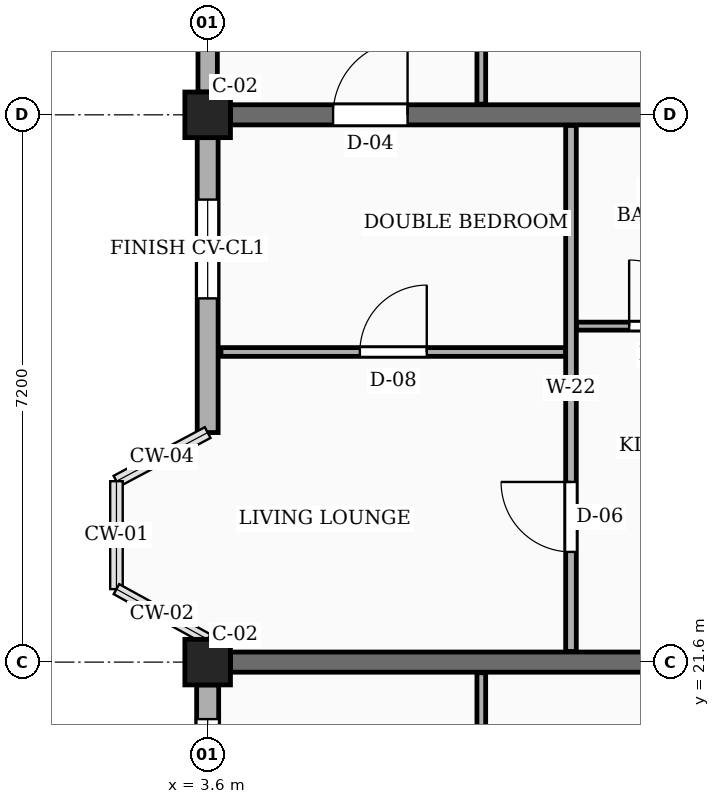
"""IFC4 building model, lengths in metres.
Left out: names, types, materials, properties, quantities, classifications, styles, units other than length and angle.
Written with IfcOpenShell. Run it as: python <this file> out.ifc"""

import sys

from ifc_helpers import new_model, si_unit, direction, frame, frame_2d, origin, origin_2d, place, context, subcontext, project, spatial, rectangle, extrude, element, fill, save


model = new_model("IFC4")
c1 = context("Model", 3, precision=1e-05, world=origin(), true_north=direction((0.0, 1.0)))
c2 = subcontext(c1, "Body", "Model", "MODEL_VIEW")
j1 = project(units=[si_unit("LENGTHUNIT", "METRE"), si_unit("PLANEANGLEUNIT", "RADIAN")], contexts=[c1])
p1 = place(None, origin())
s1 = spatial("IfcSite", under=j1, at=p1, CompositionType="ELEMENT")
p2 = place(p1, origin())
s2 = spatial("IfcBuilding", under=s1, at=p2, CompositionType="ELEMENT")
p3 = place(p2, frame((0.0, 0.0, 7.65)))
s3 = spatial("IfcBuildingStorey", under=s2, at=p3, CompositionType="ELEMENT", Elevation=7.65)
for number, where, z_axis, x_axis in (
    (1, (3.6, 21.6, 0.0), (0.0, 0.0, 1.0), (1.0, 0.0, 0.0)),
    (2, (3.6, 28.8, 0.0), (0.0, 0.0, 1.0), (1.0, 0.0, 0.0)),
):
    element("IfcColumn", number, at=place(p3, frame(where, z_axis=z_axis, x_axis=x_axis)), inside=s3, PredefinedType="COLUMN", context=c2, shape_type="SweptSolid", body=[
        extrude(rectangle(XDim=0.6, YDim=0.6, at=origin_2d()), origin(), (0.0, 0.0, 1.0), 3.15),
    ])
p4 = place(p3, frame((3.9, 21.6, 0.0), z_axis=(0.0, 0.0, 1.0), x_axis=(1.0, 0.0, 0.0)))
e3 = element("IfcWall", 3, at=p4, inside=s3, PredefinedType="SOLIDWALL", context=c2, shape_type="SweptSolid", body=[
    extrude(rectangle(XDim=6.575, YDim=0.265, at=frame_2d((3.288, 0.0))), origin(), (0.0, 0.0, 1.0), 2.17),
])
p5 = place(p3, frame((3.9, 28.8, 0.0), z_axis=(0.0, 0.0, 1.0), x_axis=(1.0, 0.0, 0.0)))
e4 = element("IfcWall", 4, at=p5, inside=s3, PredefinedType="SOLIDWALL", context=c2, shape_type="SweptSolid", body=[
    extrude(rectangle(XDim=6.575, YDim=0.265, at=frame_2d((3.288, 0.0))), origin(), (0.0, 0.0, 1.0), 2.17),
])
p6 = place(p5, frame((1.35, 0.0, 0.0)))
e5 = element("IfcOpeningElement", 5, at=p6, cuts=e4, PredefinedType="OPENING", context=c2, shape_type="SweptSolid", body=[
    extrude(rectangle(XDim=0.98, YDim=2.12, at=frame_2d((0.49, 1.06))), frame((0.0, 0.143, 0.0), z_axis=(0.0, -1.0, 0.0), x_axis=(1.0, 0.0, 0.0)), (0.0, 0.0, 1.0), 0.285),
])
p7 = place(p3, frame((3.6, 35.7, 0.0), z_axis=(0.0, 0.0, 1.0), x_axis=(0.0, -1.0, 0.0)))
e6 = element("IfcWall", 6, at=p7, inside=s3, PredefinedType="SOLIDWALL", context=c2, shape_type="SweptSolid", body=[
    extrude(rectangle(XDim=6.6, YDim=0.255, at=frame_2d((3.3, 0.0))), origin(), (0.0, 0.0, 1.0), 2.44),
])
p8 = place(p7, frame((0.45, 0.0, 0.78)))
e7 = element("IfcOpeningElement", 7, at=p8, cuts=e6, PredefinedType="OPENING", context=c2, shape_type="SweptSolid", body=[
    extrude(rectangle(XDim=1.14, YDim=1.36, at=frame_2d((0.57, 0.68))), frame((0.0, 0.137, 0.0), z_axis=(0.0, -1.0, 0.0), x_axis=(1.0, 0.0, 0.0)), (0.0, 0.0, 1.0), 0.275),
])
p9 = place(p7, frame((4.65, 0.0, 0.78)))
e8 = element("IfcOpeningElement", 8, at=p9, cuts=e6, PredefinedType="OPENING", context=c2, shape_type="SweptSolid", body=[
    extrude(rectangle(XDim=1.3, YDim=1.36, at=frame_2d((0.65, 0.68))), frame((0.0, 0.137, 0.0), z_axis=(0.0, -1.0, 0.0), x_axis=(1.0, 0.0, 0.0)), (0.0, 0.0, 1.0), 0.275),
])
p10 = place(p3, frame((3.6, 28.5, 0.0), z_axis=(0.0, 0.0, 1.0), x_axis=(0.0, -1.0, 0.0)))
e9 = element("IfcWall", 9, at=p10, inside=s3, PredefinedType="SOLIDWALL", context=c2, shape_type="SweptSolid", body=[
    extrude(rectangle(XDim=3.88, YDim=0.275, at=frame_2d((1.94, 0.0))), origin(), (0.0, 0.0, 1.0), 2.44),
])
p11 = place(p10, frame((0.815, 0.0, 0.78)))
e10 = element("IfcOpeningElement", 10, at=p11, cuts=e9, PredefinedType="OPENING", context=c2, shape_type="SweptSolid", body=[
    extrude(rectangle(XDim=1.3, YDim=1.36, at=frame_2d((0.65, 0.68))), frame((0.0, 0.147, 0.0), z_axis=(0.0, -1.0, 0.0), x_axis=(1.0, 0.0, 0.0)), (0.0, 0.0, 1.0), 0.295),
])
p12 = place(p3, frame((3.6, 21.3, 0.0), z_axis=(0.0, 0.0, 1.0), x_axis=(0.0, -1.0, 0.0)))
e11 = element("IfcWall", 11, at=p12, inside=s3, PredefinedType="SOLIDWALL", context=c2, shape_type="SweptSolid", body=[
    extrude(rectangle(XDim=6.6, YDim=0.29, at=frame_2d((3.3, 0.0))), origin(), (0.0, 0.0, 1.0), 2.44),
])
p13 = place(p12, frame((0.45, 0.0, 0.78)))
e12 = element("IfcOpeningElement", 12, at=p13, cuts=e11, PredefinedType="OPENING", context=c2, shape_type="SweptSolid", body=[
    extrude(rectangle(XDim=1.38, YDim=1.36, at=frame_2d((0.69, 0.68))), frame((0.0, 0.155, 0.0), z_axis=(0.0, -1.0, 0.0), x_axis=(1.0, 0.0, 0.0)), (0.0, 0.0, 1.0), 0.31),
])
p14 = place(p12, frame((4.65, 0.0, 0.78)))
e13 = element("IfcOpeningElement", 13, at=p14, cuts=e11, PredefinedType="OPENING", context=c2, shape_type="SweptSolid", body=[
    extrude(rectangle(XDim=0.94, YDim=1.44, at=frame_2d((0.47, 0.72))), frame((0.0, 0.155, 0.0), z_axis=(0.0, -1.0, 0.0), x_axis=(1.0, 0.0, 0.0)), (0.0, 0.0, 1.0), 0.31),
])
p15 = place(p3, frame((7.2, 14.54, 0.0), z_axis=(0.0, 0.0, 1.0), x_axis=(0.0, 1.0, 0.0)))
e14 = element("IfcWall", 14, at=p15, inside=s3, PredefinedType="PARTITIONING", context=c2, shape_type="SweptSolid", body=[
    extrude(rectangle(XDim=6.92, YDim=0.115, at=frame_2d((3.46, 0.0))), origin(), (0.0, 0.0, 1.0), 2.305),
])
p16 = place(p15, frame((1.05, 0.0, 0.0)))
e15 = element("IfcOpeningElement", 15, at=p16, cuts=e14, PredefinedType="OPENING", context=c2, shape_type="SweptSolid", body=[
    extrude(rectangle(XDim=0.87, YDim=2.05, at=frame_2d((0.435, 1.025))), frame((0.0, 0.067, 0.0), z_axis=(0.0, -1.0, 0.0), x_axis=(1.0, 0.0, 0.0)), (0.0, 0.0, 1.0), 0.135),
])
p17 = place(p15, frame((4.45, 0.0, 0.0)))
e16 = element("IfcOpeningElement", 16, at=p17, cuts=e14, PredefinedType="OPENING", context=c2, shape_type="SweptSolid", body=[
    extrude(rectangle(XDim=0.88, YDim=2.08, at=frame_2d((0.44, 1.04))), frame((0.0, 0.067, 0.0), z_axis=(0.0, -1.0, 0.0), x_axis=(1.0, 0.0, 0.0)), (0.0, 0.0, 1.0), 0.135),
])
p18 = place(p3, frame((3.775, 25.68, 0.0), z_axis=(0.0, 0.0, 1.0), x_axis=(1.0, 0.0, 0.0)))
e17 = element("IfcWall", 17, at=p18, inside=s3, PredefinedType="PARTITIONING", context=c2, shape_type="SweptSolid", body=[
    extrude(rectangle(XDim=4.535, YDim=0.115, at=frame_2d((2.268, 0.0))), origin(), (0.0, 0.0, 1.0), 2.305),
])
p19 = place(p18, frame((1.827, 0.0, 0.0)))
e18 = element("IfcOpeningElement", 18, at=p19, cuts=e17, PredefinedType="OPENING", context=c2, shape_type="SweptSolid", body=[
    extrude(rectangle(XDim=0.88, YDim=2.08, at=frame_2d((0.44, 1.04))), frame((0.0, 0.067, 0.0), z_axis=(0.0, -1.0, 0.0), x_axis=(1.0, 0.0, 0.0)), (0.0, 0.0, 1.0), 0.135),
])
p20 = place(p3, frame((8.45, 26.02, 0.0), z_axis=(0.0, 0.0, 1.0), x_axis=(1.0, 0.0, 0.0)))
e19 = element("IfcWall", 19, at=p20, inside=s3, PredefinedType="PARTITIONING", context=c2, shape_type="SweptSolid", body=[
    extrude(rectangle(XDim=2.26, YDim=0.105, at=frame_2d((1.13, 0.0))), origin(), (0.0, 0.0, 1.0), 2.305),
])
p21 = place(p20, frame((0.695, 0.0, 0.0)))
e20 = element("IfcOpeningElement", 20, at=p21, cuts=e19, PredefinedType="OPENING", context=c2, shape_type="SweptSolid", body=[
    extrude(rectangle(XDim=0.87, YDim=2.05, at=frame_2d((0.435, 1.025))), frame((0.0, 0.062, 0.0), z_axis=(0.0, -1.0, 0.0), x_axis=(1.0, 0.0, 0.0)), (0.0, 0.0, 1.0), 0.125),
])
p22 = place(p3, frame((8.38, 21.74, 0.0), z_axis=(0.0, 0.0, 1.0), x_axis=(0.0, 1.0, 0.0)))
e21 = element("IfcWall", 21, at=p22, inside=s3, PredefinedType="PARTITIONING", context=c2, shape_type="SweptSolid", body=[
    extrude(rectangle(XDim=6.92, YDim=0.14, at=frame_2d((3.46, 0.0))), origin(), (0.0, 0.0, 1.0), 2.305),
])
p23 = place(p22, frame((1.31, 0.0, 0.0)))
e22 = element("IfcOpeningElement", 22, at=p23, cuts=e21, PredefinedType="OPENING", context=c2, shape_type="SweptSolid", body=[
    extrude(rectangle(XDim=0.92, YDim=2.1, at=frame_2d((0.46, 1.05))), frame((0.0, 0.08, 0.0), z_axis=(0.0, -1.0, 0.0), x_axis=(1.0, 0.0, 0.0)), (0.0, 0.0, 1.0), 0.16),
])
p24 = place(p3, frame((7.2, 28.94, 0.0), z_axis=(0.0, 0.0, 1.0), x_axis=(0.0, 1.0, 0.0)))
e23 = element("IfcWall", 23, at=p24, inside=s3, PredefinedType="PARTITIONING", context=c2, shape_type="SweptSolid", body=[
    extrude(rectangle(XDim=6.92, YDim=0.115, at=frame_2d((3.46, 0.0))), origin(), (0.0, 0.0, 1.0), 2.305),
])
p25 = place(p24, frame((1.05, 0.0, 0.0)))
e24 = element("IfcOpeningElement", 24, at=p25, cuts=e23, PredefinedType="OPENING", context=c2, shape_type="SweptSolid", body=[
    extrude(rectangle(XDim=0.87, YDim=2.05, at=frame_2d((0.435, 1.025))), frame((0.0, 0.067, 0.0), z_axis=(0.0, -1.0, 0.0), x_axis=(1.0, 0.0, 0.0)), (0.0, 0.0, 1.0), 0.135),
])
p26 = place(p24, frame((4.45, 0.0, 0.0)))
e25 = element("IfcOpeningElement", 25, at=p26, cuts=e23, PredefinedType="OPENING", context=c2, shape_type="SweptSolid", body=[
    extrude(rectangle(XDim=0.88, YDim=2.08, at=frame_2d((0.44, 1.04))), frame((0.0, 0.067, 0.0), z_axis=(0.0, -1.0, 0.0), x_axis=(1.0, 0.0, 0.0)), (0.0, 0.0, 1.0), 0.135),
])
p27 = place(p11, origin())
e26 = element("IfcWindow", 26, at=p27, inside=s3, PartitioningType="SINGLE_PANEL", PredefinedType="WINDOW", context=c2, shape_type="SweptSolid", body=[
    extrude(rectangle(XDim=1.3, YDim=1.36, at=frame_2d((0.65, 0.68))), frame((0.0, 0.03, 0.0), z_axis=(0.0, -1.0, 0.0), x_axis=(1.0, 0.0, 0.0)), (0.0, 0.0, 1.0), 0.06),
])
fill(e10, e26)
p28 = place(p13, origin())
e27 = element("IfcWindow", 27, at=p28, inside=s3, PartitioningType="SINGLE_PANEL", PredefinedType="WINDOW", context=c2, shape_type="SweptSolid", body=[
    extrude(rectangle(XDim=1.38, YDim=1.36, at=frame_2d((0.69, 0.68))), frame((0.0, 0.03, 0.0), z_axis=(0.0, -1.0, 0.0), x_axis=(1.0, 0.0, 0.0)), (0.0, 0.0, 1.0), 0.06),
])
fill(e12, e27)
p29 = place(p19, origin())
e28 = element("IfcDoor", 28, at=p29, inside=s3, OperationType="SINGLE_SWING_RIGHT", PredefinedType="DOOR", context=c2, shape_type="SweptSolid", body=[
    extrude(rectangle(XDim=0.88, YDim=2.08, at=frame_2d((0.44, 1.04))), frame((0.0, 0.025, 0.0), z_axis=(0.0, -1.0, 0.0), x_axis=(1.0, 0.0, 0.0)), (0.0, 0.0, 1.0), 0.05),
])
fill(e18, e28)
p30 = place(p21, origin())
e29 = element("IfcDoor", 29, at=p30, inside=s3, OperationType="SINGLE_SWING_LEFT", PredefinedType="DOOR", context=c2, shape_type="SweptSolid", body=[
    extrude(rectangle(XDim=0.87, YDim=2.05, at=frame_2d((0.435, 1.025))), frame((0.0, 0.025, 0.0), z_axis=(0.0, -1.0, 0.0), x_axis=(1.0, 0.0, 0.0)), (0.0, 0.0, 1.0), 0.05),
])
fill(e20, e29)
p31 = place(p23, origin())
e30 = element("IfcDoor", 30, at=p31, inside=s3, OperationType="SINGLE_SWING_RIGHT", PredefinedType="DOOR", context=c2, shape_type="SweptSolid", body=[
    extrude(rectangle(XDim=0.92, YDim=2.1, at=frame_2d((0.46, 1.05))), frame((0.0, 0.025, 0.0), z_axis=(0.0, -1.0, 0.0), x_axis=(1.0, 0.0, 0.0)), (0.0, 0.0, 1.0), 0.05),
])
fill(e22, e30)
p32 = place(p6, origin())
e31 = element("IfcDoor", 31, at=p32, inside=s3, OperationType="SINGLE_SWING_RIGHT", PredefinedType="DOOR", context=c2, shape_type="SweptSolid", body=[
    extrude(rectangle(XDim=0.98, YDim=2.12, at=frame_2d((0.49, 1.06))), frame((0.0, 0.025, 0.0), z_axis=(0.0, -1.0, 0.0), x_axis=(1.0, 0.0, 0.0)), (0.0, 0.0, 1.0), 0.05),
])
fill(e5, e31)
save(model, sys.argv[1])
